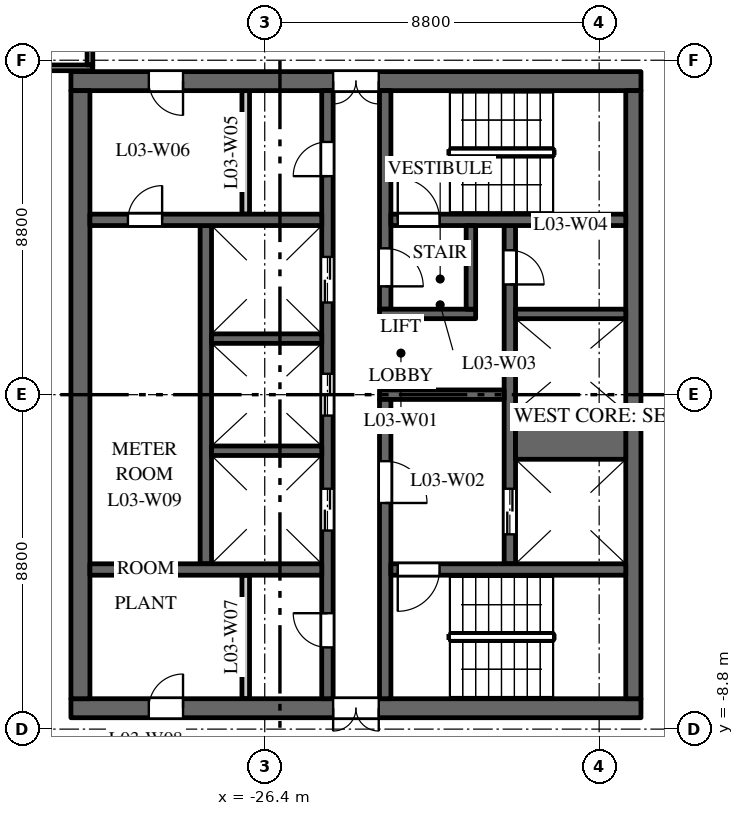
"""IFC4 building model, lengths in metres.
Left out: names, types, materials, properties, quantities, classifications, styles, units other than length and angle.
Written with IfcOpenShell. Run it as: python <this file> out.ifc"""

import sys

from ifc_helpers import new_model, si_unit, direction, frame, frame_2d, origin, place, context, subcontext, project, spatial, rectangle, extrude, element, fill, save


model = new_model("IFC4")
c1 = context("Model", 3, precision=1e-05, world=origin(), true_north=direction((0.0, 1.0)))
c2 = subcontext(c1, "Body", "Model", "MODEL_VIEW")
j1 = project(units=[si_unit("LENGTHUNIT", "METRE"), si_unit("PLANEANGLEUNIT", "RADIAN")], contexts=[c1])
p1 = place(None, origin())
s1 = spatial("IfcSite", under=j1, at=p1, CompositionType="ELEMENT")
p2 = place(p1, origin())
s2 = spatial("IfcBuilding", under=s1, at=p2, CompositionType="ELEMENT")
p3 = place(p2, frame((0.0, 0.0, 19.5)))
s3 = spatial("IfcBuildingStorey", under=s2, at=p3, CompositionType="ELEMENT", Elevation=19.5)
p4 = place(p3, frame((-16.5, 8.25, 0.0), z_axis=(0.0, 0.0, 1.0), x_axis=(-1.0, 0.0, 0.0)))
e1 = element("IfcWall", 1, at=p4, inside=s3, PredefinedType="SHEAR", context=c2, shape_type="SweptSolid", body=[
    extrude(rectangle(XDim=15.0, YDim=0.5, at=frame_2d((7.5, 0.0))), origin(), (0.0, 0.0, 1.0), 5.25),
])
p5 = place(p4, frame((6.9, 0.0, 0.0)))
e2 = element("IfcOpeningElement", 2, at=p5, cuts=e1, PredefinedType="OPENING", context=c2, shape_type="SweptSolid", body=[
    extrude(rectangle(XDim=1.2, YDim=2.1, at=frame_2d((0.6, 1.05))), frame((0.0, 0.26, 0.0), z_axis=(0.0, -1.0, 0.0), x_axis=(1.0, 0.0, 0.0)), (0.0, 0.0, 1.0), 0.52),
])
p6 = place(p4, frame((12.05, 0.0, 0.0)))
e3 = element("IfcOpeningElement", 3, at=p6, cuts=e1, PredefinedType="OPENING", context=c2, shape_type="SweptSolid", body=[
    extrude(rectangle(XDim=0.9, YDim=2.1, at=frame_2d((0.45, 1.05))), frame((0.0, 0.26, 0.0), z_axis=(0.0, -1.0, 0.0), x_axis=(1.0, 0.0, 0.0)), (0.0, 0.0, 1.0), 0.52),
])
p7 = place(p3, frame((-16.5, -8.25, 0.0), z_axis=(0.0, 0.0, 1.0), x_axis=(-1.0, 0.0, 0.0)))
e4 = element("IfcWall", 4, at=p7, inside=s3, PredefinedType="SHEAR", context=c2, shape_type="SweptSolid", body=[
    extrude(rectangle(XDim=15.0, YDim=0.5, at=frame_2d((7.5, 0.0))), origin(), (0.0, 0.0, 1.0), 5.25),
])
p8 = place(p7, frame((6.9, 0.0, 0.0)))
e5 = element("IfcOpeningElement", 5, at=p8, cuts=e4, PredefinedType="OPENING", context=c2, shape_type="SweptSolid", body=[
    extrude(rectangle(XDim=1.2, YDim=2.1, at=frame_2d((0.6, 1.05))), frame((0.0, 0.26, 0.0), z_axis=(0.0, -1.0, 0.0), x_axis=(1.0, 0.0, 0.0)), (0.0, 0.0, 1.0), 0.52),
])
p9 = place(p7, frame((12.05, 0.0, 0.0)))
e6 = element("IfcOpeningElement", 6, at=p9, cuts=e4, PredefinedType="OPENING", context=c2, shape_type="SweptSolid", body=[
    extrude(rectangle(XDim=0.9, YDim=2.1, at=frame_2d((0.45, 1.05))), frame((0.0, 0.26, 0.0), z_axis=(0.0, -1.0, 0.0), x_axis=(1.0, 0.0, 0.0)), (0.0, 0.0, 1.0), 0.52),
])
p10 = place(p3, frame((-27.95, -4.45, 0.0), z_axis=(0.0, 0.0, 1.0), x_axis=(0.0, 1.0, 0.0)))
e7 = element("IfcWall", 7, at=p10, inside=s3, PredefinedType="SHEAR", context=c2, shape_type="SweptSolid", body=[
    extrude(rectangle(XDim=8.9, YDim=0.3, at=frame_2d((4.45, 0.0))), origin(), (0.0, 0.0, 1.0), 5.25),
])
p11 = place(p3, frame((-19.95, -4.45, 0.0), z_axis=(0.0, 0.0, 1.0), x_axis=(0.0, 1.0, 0.0)))
e8 = element("IfcWall", 8, at=p11, inside=s3, PredefinedType="SHEAR", context=c2, shape_type="SweptSolid", body=[
    extrude(rectangle(XDim=8.9, YDim=0.3, at=frame_2d((4.45, 0.0))), origin(), (0.0, 0.0, 1.0), 5.25),
])
p12 = place(p11, frame((0.775, 0.0, 0.0)))
e9 = element("IfcOpeningElement", 9, at=p12, cuts=e8, PredefinedType="OPENING", context=c2, shape_type="SweptSolid", body=[
    extrude(rectangle(XDim=1.2, YDim=2.1, at=frame_2d((0.6, 1.05))), frame((0.0, 0.16, 0.0), z_axis=(0.0, -1.0, 0.0), x_axis=(1.0, 0.0, 0.0)), (0.0, 0.0, 1.0), 0.32),
])
p13 = place(p11, frame((7.35, 0.0, 0.0)))
e10 = element("IfcOpeningElement", 10, at=p13, cuts=e8, PredefinedType="OPENING", context=c2, shape_type="SweptSolid", body=[
    extrude(rectangle(XDim=0.9, YDim=2.1, at=frame_2d((0.45, 1.05))), frame((0.0, 0.16, 0.0), z_axis=(0.0, -1.0, 0.0), x_axis=(1.0, 0.0, 0.0)), (0.0, 0.0, 1.0), 0.32),
])
p14 = place(p3, frame((-24.75, -8.0, 0.0), z_axis=(0.0, 0.0, 1.0), x_axis=(0.0, 1.0, 0.0)))
e11 = element("IfcWall", 11, at=p14, inside=s3, PredefinedType="SHEAR", context=c2, shape_type="SweptSolid", body=[
    extrude(rectangle(XDim=16.0, YDim=0.3, at=frame_2d((8.0, 0.0))), origin(), (0.0, 0.0, 1.0), 5.25),
])
p15 = place(p14, frame((4.425, 0.0, 0.0)))
e12 = element("IfcOpeningElement", 12, at=p15, cuts=e11, PredefinedType="OPENING", context=c2, shape_type="SweptSolid", body=[
    extrude(rectangle(XDim=1.1, YDim=2.1, at=frame_2d((0.55, 1.05))), frame((0.0, 0.16, 0.0), z_axis=(0.0, -1.0, 0.0), x_axis=(1.0, 0.0, 0.0)), (0.0, 0.0, 1.0), 0.32),
])
p16 = place(p14, frame((7.45, 0.0, 0.0)))
e13 = element("IfcOpeningElement", 13, at=p16, cuts=e11, PredefinedType="OPENING", context=c2, shape_type="SweptSolid", body=[
    extrude(rectangle(XDim=1.1, YDim=2.1, at=frame_2d((0.55, 1.05))), frame((0.0, 0.16, 0.0), z_axis=(0.0, -1.0, 0.0), x_axis=(1.0, 0.0, 0.0)), (0.0, 0.0, 1.0), 0.32),
])
p17 = place(p14, frame((10.425, 0.0, 0.0)))
e14 = element("IfcOpeningElement", 14, at=p17, cuts=e11, PredefinedType="OPENING", context=c2, shape_type="SweptSolid", body=[
    extrude(rectangle(XDim=1.2, YDim=2.1, at=frame_2d((0.6, 1.05))), frame((0.0, 0.16, 0.0), z_axis=(0.0, -1.0, 0.0), x_axis=(1.0, 0.0, 0.0)), (0.0, 0.0, 1.0), 0.32),
])
p18 = place(p14, frame((13.75, 0.0, 0.0)))
e15 = element("IfcOpeningElement", 15, at=p18, cuts=e11, PredefinedType="OPENING", context=c2, shape_type="SweptSolid", body=[
    extrude(rectangle(XDim=0.9, YDim=2.1, at=frame_2d((0.45, 1.05))), frame((0.0, 0.16, 0.0), z_axis=(0.0, -1.0, 0.0), x_axis=(1.0, 0.0, 0.0)), (0.0, 0.0, 1.0), 0.32),
])
p19 = place(p14, frame((1.35, 0.0, 0.0)))
e16 = element("IfcOpeningElement", 16, at=p19, cuts=e11, PredefinedType="OPENING", context=c2, shape_type="SweptSolid", body=[
    extrude(rectangle(XDim=0.9, YDim=2.1, at=frame_2d((0.45, 1.05))), frame((0.0, 0.16, 0.0), z_axis=(0.0, -1.0, 0.0), x_axis=(1.0, 0.0, 0.0)), (0.0, 0.0, 1.0), 0.32),
])
p20 = place(p3, frame((-20.1, 0.0, 0.0), z_axis=(0.0, 0.0, 1.0), x_axis=(-1.0, 0.0, 0.0)))
e17 = element("IfcWall", 17, at=p20, inside=s3, PredefinedType="SHEAR", context=c2, shape_type="SweptSolid", body=[
    extrude(rectangle(XDim=3.28, YDim=0.25, at=frame_2d((1.64, 0.0))), origin(), (0.0, 0.0, 1.0), 5.25),
])
p21 = place(p3, frame((-16.7, -8.0, 0.0), z_axis=(0.0, 0.0, 1.0), x_axis=(0.0, 1.0, 0.0)))
e18 = element("IfcWall", 18, at=p21, inside=s3, PredefinedType="SHEAR", context=c2, shape_type="SweptSolid", body=[
    extrude(rectangle(XDim=16.0, YDim=0.4, at=frame_2d((8.0, 0.0))), origin(), (0.0, 0.0, 1.0), 5.25),
])
p22 = place(p3, frame((-31.25, -8.0, 0.0), z_axis=(0.0, 0.0, 1.0), x_axis=(0.0, 1.0, 0.0)))
e19 = element("IfcWall", 19, at=p22, inside=s3, PredefinedType="SHEAR", context=c2, shape_type="SweptSolid", body=[
    extrude(rectangle(XDim=16.0, YDim=0.5, at=frame_2d((8.0, 0.0))), origin(), (0.0, 0.0, 1.0), 5.25),
])
p23 = place(p3, frame((-24.9, 4.6, 0.0), z_axis=(0.0, 0.0, 1.0), x_axis=(-1.0, 0.0, 0.0)))
e20 = element("IfcWall", 20, at=p23, inside=s3, PredefinedType="SHEAR", context=c2, shape_type="SweptSolid", body=[
    extrude(rectangle(XDim=6.1, YDim=0.3, at=frame_2d((3.05, 0.0))), origin(), (0.0, 0.0, 1.0), 5.25),
])
p24 = place(p23, frame((4.2, 0.0, 0.0)))
e21 = element("IfcOpeningElement", 21, at=p24, cuts=e20, PredefinedType="OPENING", context=c2, shape_type="SweptSolid", body=[
    extrude(rectangle(XDim=0.9, YDim=2.1, at=frame_2d((0.45, 1.05))), frame((0.0, 0.16, 0.0), z_axis=(0.0, -1.0, 0.0), x_axis=(1.0, 0.0, 0.0)), (0.0, 0.0, 1.0), 0.32),
])
for number, where, z_axis, x_axis in (
    (22, (-26.9, 4.75, 0.0), (0.0, 0.0, 1.0), (0.0, 1.0, 0.0)),
    (23, (-26.9, -8.0, 0.0), (0.0, 0.0, 1.0), (0.0, 1.0, 0.0)),
):
    element("IfcWall", number, at=place(p3, frame(where, z_axis=z_axis, x_axis=x_axis)), inside=s3, PredefinedType="PARTITIONING", context=c2, shape_type="SweptSolid", body=[
        extrude(rectangle(XDim=3.25, YDim=0.2, at=frame_2d((1.625, 0.0))), origin(), (0.0, 0.0, 1.0), 5.25),
    ])
p25 = place(p3, frame((-24.9, -4.6, 0.0), z_axis=(0.0, 0.0, 1.0), x_axis=(-1.0, 0.0, 0.0)))
e24 = element("IfcWall", 24, at=p25, inside=s3, PredefinedType="SHEAR", context=c2, shape_type="SweptSolid", body=[
    extrude(rectangle(XDim=6.1, YDim=0.3, at=frame_2d((3.05, 0.0))), origin(), (0.0, 0.0, 1.0), 5.25),
])
p26 = place(p3, frame((-16.9, -1.075, 0.0), z_axis=(0.0, 0.0, 1.0), x_axis=(-1.0, 0.0, 0.0)))
e25 = element("IfcWall", 25, at=p26, inside=s3, PredefinedType="SHEAR", context=c2, shape_type="SweptSolid", body=[
    extrude(rectangle(XDim=2.9, YDim=1.25, at=frame_2d((1.45, 0.0))), origin(), (0.0, 0.0, 1.0), 5.25),
])
for number, where, z_axis, x_axis in (
    (26, (-16.9, 2.125, 0.0), (0.0, 0.0, 1.0), (-1.0, 0.0, 0.0)),
    (27, (-24.9, -1.475, 0.0), (0.0, 0.0, 1.0), (-1.0, 0.0, 0.0)),
    (28, (-24.9, 1.475, 0.0), (0.0, 0.0, 1.0), (-1.0, 0.0, 0.0)),
):
    element("IfcWall", number, at=place(p3, frame(where, z_axis=z_axis, x_axis=x_axis)), inside=s3, PredefinedType="SHEAR", context=c2, shape_type="SweptSolid", body=[
        extrude(rectangle(XDim=2.9, YDim=0.25, at=frame_2d((1.45, 0.0))), origin(), (0.0, 0.0, 1.0), 5.25),
    ])
p27 = place(p3, frame((-23.23, 2.25, 0.0), z_axis=(0.0, 0.0, 1.0), x_axis=(0.0, 1.0, 0.0)))
e29 = element("IfcWall", 29, at=p27, inside=s3, PredefinedType="SHEAR", context=c2, shape_type="SweptSolid", body=[
    extrude(rectangle(XDim=5.75, YDim=0.3, at=frame_2d((2.875, 0.0))), origin(), (0.0, 0.0, 1.0), 5.25),
])
p28 = place(p27, frame((0.6, 0.0, 0.0)))
e30 = element("IfcOpeningElement", 30, at=p28, cuts=e29, PredefinedType="OPENING", context=c2, shape_type="SweptSolid", body=[
    extrude(rectangle(XDim=1.0, YDim=2.1, at=frame_2d((0.5, 1.05))), frame((0.0, 0.16, 0.0), z_axis=(0.0, -1.0, 0.0), x_axis=(1.0, 0.0, 0.0)), (0.0, 0.0, 1.0), 0.32),
])
p29 = place(p3, frame((-23.23, -8.0, 0.0), z_axis=(0.0, 0.0, 1.0), x_axis=(0.0, 1.0, 0.0)))
e31 = element("IfcWall", 31, at=p29, inside=s3, PredefinedType="SHEAR", context=c2, shape_type="SweptSolid", body=[
    extrude(rectangle(XDim=7.875, YDim=0.3, at=frame_2d((3.938, 0.0))), origin(), (0.0, 0.0, 1.0), 5.25),
])
p30 = place(p29, frame((5.15, 0.0, 0.0)))
e32 = element("IfcOpeningElement", 32, at=p30, cuts=e31, PredefinedType="OPENING", context=c2, shape_type="SweptSolid", body=[
    extrude(rectangle(XDim=1.1, YDim=2.1, at=frame_2d((0.55, 1.05))), frame((0.0, 0.16, 0.0), z_axis=(0.0, -1.0, 0.0), x_axis=(1.0, 0.0, 0.0)), (0.0, 0.0, 1.0), 0.32),
])
p31 = place(p3, frame((-16.9, 4.6, 0.0), z_axis=(0.0, 0.0, 1.0), x_axis=(-1.0, 0.0, 0.0)))
e33 = element("IfcWall", 33, at=p31, inside=s3, PredefinedType="SHEAR", context=c2, shape_type="SweptSolid", body=[
    extrude(rectangle(XDim=6.18, YDim=0.3, at=frame_2d((3.09, 0.0))), origin(), (0.0, 0.0, 1.0), 5.25),
])
p32 = place(p31, frame((4.9, 0.0, 0.0)))
e34 = element("IfcOpeningElement", 34, at=p32, cuts=e33, PredefinedType="OPENING", context=c2, shape_type="SweptSolid", body=[
    extrude(rectangle(XDim=1.1, YDim=2.1, at=frame_2d((0.55, 1.05))), frame((0.0, 0.16, 0.0), z_axis=(0.0, -1.0, 0.0), x_axis=(1.0, 0.0, 0.0)), (0.0, 0.0, 1.0), 0.32),
])
p33 = place(p3, frame((-16.9, -4.6, 0.0), z_axis=(0.0, 0.0, 1.0), x_axis=(-1.0, 0.0, 0.0)))
e35 = element("IfcWall", 35, at=p33, inside=s3, PredefinedType="SHEAR", context=c2, shape_type="SweptSolid", body=[
    extrude(rectangle(XDim=6.18, YDim=0.3, at=frame_2d((3.09, 0.0))), origin(), (0.0, 0.0, 1.0), 5.25),
])
p34 = place(p33, frame((4.9, 0.0, 0.0)))
e36 = element("IfcOpeningElement", 36, at=p34, cuts=e35, PredefinedType="OPENING", context=c2, shape_type="SweptSolid", body=[
    extrude(rectangle(XDim=1.1, YDim=2.1, at=frame_2d((0.55, 1.05))), frame((0.0, 0.16, 0.0), z_axis=(0.0, -1.0, 0.0), x_axis=(1.0, 0.0, 0.0)), (0.0, 0.0, 1.0), 0.32),
])
p35 = place(p3, frame((-20.85, 2.125, 0.0), z_axis=(0.0, 0.0, 1.0), x_axis=(-1.0, 0.0, 0.0)))
e37 = element("IfcWall", 37, at=p35, inside=s3, PredefinedType="SHEAR", context=c2, shape_type="SweptSolid", body=[
    extrude(rectangle(XDim=2.53, YDim=0.25, at=frame_2d((1.265, 0.0))), origin(), (0.0, 0.0, 1.0), 5.25),
])
p36 = place(p3, frame((-20.975, 2.25, 0.0), z_axis=(0.0, 0.0, 1.0), x_axis=(0.0, 1.0, 0.0)))
e38 = element("IfcWall", 38, at=p36, inside=s3, PredefinedType="SHEAR", context=c2, shape_type="SweptSolid", body=[
    extrude(rectangle(XDim=2.2, YDim=0.25, at=frame_2d((1.1, 0.0))), origin(), (0.0, 0.0, 1.0), 5.25),
])
p37 = place(p3, frame((-30.925, 8.6, 0.0), z_axis=(0.0, 0.0, 1.0), x_axis=(-1.0, 0.0, 0.0)))
e39 = element("IfcWall", 39, at=p37, inside=s3, PredefinedType="PARTITIONING", context=c2, shape_type="SweptSolid", body=[
    extrude(rectangle(XDim=8.025, YDim=0.15, at=frame_2d((4.012, 0.0))), origin(), (0.0, 0.0, 1.0), 4.35),
])
p38 = place(p37, frame((4.012, 0.0, 0.0)))
e40 = element("IfcOpeningElement", 40, at=p38, cuts=e39, PredefinedType="OPENING", context=c2, shape_type="SweptSolid", body=[
    extrude(rectangle(XDim=1.0, YDim=2.1, at=frame_2d((0.5, 1.05))), frame((0.0, 0.085, 0.0), z_axis=(0.0, -1.0, 0.0), x_axis=(1.0, 0.0, 0.0)), (0.0, 0.0, 1.0), 0.17),
])
p39 = place(p3, frame((-31.0, 11.925, 0.0), z_axis=(0.0, 0.0, 1.0), x_axis=(0.0, -1.0, 0.0)))
e41 = element("IfcWall", 41, at=p39, inside=s3, PredefinedType="PARTITIONING", context=c2, shape_type="SweptSolid", body=[
    extrude(rectangle(XDim=3.25, YDim=0.15, at=frame_2d((1.625, 0.0))), origin(), (0.0, 0.0, 1.0), 5.25),
])
p40 = place(p12, origin())
e42 = element("IfcDoor", 42, at=p40, inside=s3, OperationType="DOUBLE_DOOR_SLIDING", PredefinedType="DOOR", context=c2, shape_type="SweptSolid", body=[
    extrude(rectangle(XDim=1.2, YDim=2.1, at=frame_2d((0.6, 1.05))), frame((0.0, 0.025, 0.0), z_axis=(0.0, -1.0, 0.0), x_axis=(1.0, 0.0, 0.0)), (0.0, 0.0, 1.0), 0.05),
])
fill(e9, e42)
p41 = place(p15, origin())
e43 = element("IfcDoor", 43, at=p41, inside=s3, OperationType="DOUBLE_DOOR_SLIDING", PredefinedType="DOOR", context=c2, shape_type="SweptSolid", body=[
    extrude(rectangle(XDim=1.1, YDim=2.1, at=frame_2d((0.55, 1.05))), frame((0.0, 0.025, 0.0), z_axis=(0.0, -1.0, 0.0), x_axis=(1.0, 0.0, 0.0)), (0.0, 0.0, 1.0), 0.05),
])
fill(e12, e43)
p42 = place(p16, origin())
e44 = element("IfcDoor", 44, at=p42, inside=s3, OperationType="DOUBLE_DOOR_SLIDING", PredefinedType="DOOR", context=c2, shape_type="SweptSolid", body=[
    extrude(rectangle(XDim=1.1, YDim=2.1, at=frame_2d((0.55, 1.05))), frame((0.0, 0.025, 0.0), z_axis=(0.0, -1.0, 0.0), x_axis=(1.0, 0.0, 0.0)), (0.0, 0.0, 1.0), 0.05),
])
fill(e13, e44)
p43 = place(p17, origin())
e45 = element("IfcDoor", 45, at=p43, inside=s3, OperationType="DOUBLE_DOOR_SLIDING", PredefinedType="DOOR", context=c2, shape_type="SweptSolid", body=[
    extrude(rectangle(XDim=1.2, YDim=2.1, at=frame_2d((0.6, 1.05))), frame((0.0, 0.025, 0.0), z_axis=(0.0, -1.0, 0.0), x_axis=(1.0, 0.0, 0.0)), (0.0, 0.0, 1.0), 0.05),
])
fill(e14, e45)
p44 = place(p32, origin())
e46 = element("IfcDoor", 46, at=p44, inside=s3, OperationType="SINGLE_SWING_RIGHT", PredefinedType="DOOR", context=c2, shape_type="SweptSolid", body=[
    extrude(rectangle(XDim=1.1, YDim=2.1, at=frame_2d((0.55, 1.05))), frame((0.0, 0.025, 0.0), z_axis=(0.0, -1.0, 0.0), x_axis=(1.0, 0.0, 0.0)), (0.0, 0.0, 1.0), 0.05),
])
fill(e34, e46)
p45 = place(p34, origin())
e47 = element("IfcDoor", 47, at=p45, inside=s3, OperationType="SINGLE_SWING_LEFT", PredefinedType="DOOR", context=c2, shape_type="SweptSolid", body=[
    extrude(rectangle(XDim=1.1, YDim=2.1, at=frame_2d((0.55, 1.05))), frame((0.0, 0.025, 0.0), z_axis=(0.0, -1.0, 0.0), x_axis=(1.0, 0.0, 0.0)), (0.0, 0.0, 1.0), 0.05),
])
fill(e36, e47)
p46 = place(p30, origin())
e48 = element("IfcDoor", 48, at=p46, inside=s3, OperationType="SINGLE_SWING_LEFT", PredefinedType="DOOR", context=c2, shape_type="SweptSolid", body=[
    extrude(rectangle(XDim=1.1, YDim=2.1, at=frame_2d((0.55, 1.05))), frame((0.0, 0.025, 0.0), z_axis=(0.0, -1.0, 0.0), x_axis=(1.0, 0.0, 0.0)), (0.0, 0.0, 1.0), 0.05),
])
fill(e32, e48)
p47 = place(p28, origin())
e49 = element("IfcDoor", 49, at=p47, inside=s3, OperationType="SINGLE_SWING_LEFT", PredefinedType="DOOR", context=c2, shape_type="SweptSolid", body=[
    extrude(rectangle(XDim=1.0, YDim=2.1, at=frame_2d((0.5, 1.05))), frame((0.0, 0.025, 0.0), z_axis=(0.0, -1.0, 0.0), x_axis=(1.0, 0.0, 0.0)), (0.0, 0.0, 1.0), 0.05),
])
fill(e30, e49)
p48 = place(p5, origin())
e50 = element("IfcDoor", 50, at=p48, inside=s3, OperationType="DOUBLE_DOOR_DOUBLE_SWING", PredefinedType="DOOR", context=c2, shape_type="SweptSolid", body=[
    extrude(rectangle(XDim=1.2, YDim=2.1, at=frame_2d((0.6, 1.05))), frame((0.0, 0.025, 0.0), z_axis=(0.0, -1.0, 0.0), x_axis=(1.0, 0.0, 0.0)), (0.0, 0.0, 1.0), 0.05),
])
fill(e2, e50)
p49 = place(p8, origin())
e51 = element("IfcDoor", 51, at=p49, inside=s3, OperationType="DOUBLE_DOOR_DOUBLE_SWING", PredefinedType="DOOR", context=c2, shape_type="SweptSolid", body=[
    extrude(rectangle(XDim=1.2, YDim=2.1, at=frame_2d((0.6, 1.05))), frame((0.0, 0.025, 0.0), z_axis=(0.0, -1.0, 0.0), x_axis=(1.0, 0.0, 0.0)), (0.0, 0.0, 1.0), 0.05),
])
fill(e5, e51)
p50 = place(p13, origin())
e52 = element("IfcDoor", 52, at=p50, inside=s3, OperationType="SINGLE_SWING_LEFT", PredefinedType="DOOR", context=c2, shape_type="SweptSolid", body=[
    extrude(rectangle(XDim=0.9, YDim=2.1, at=frame_2d((0.45, 1.05))), frame((0.0, 0.025, 0.0), z_axis=(0.0, -1.0, 0.0), x_axis=(1.0, 0.0, 0.0)), (0.0, 0.0, 1.0), 0.05),
])
fill(e10, e52)
p51 = place(p18, origin())
e53 = element("IfcDoor", 53, at=p51, inside=s3, OperationType="SINGLE_SWING_RIGHT", PredefinedType="DOOR", context=c2, shape_type="SweptSolid", body=[
    extrude(rectangle(XDim=0.9, YDim=2.1, at=frame_2d((0.45, 1.05))), frame((0.0, 0.025, 0.0), z_axis=(0.0, -1.0, 0.0), x_axis=(1.0, 0.0, 0.0)), (0.0, 0.0, 1.0), 0.05),
])
fill(e15, e53)
p52 = place(p6, origin())
e54 = element("IfcDoor", 54, at=p52, inside=s3, OperationType="SINGLE_SWING_RIGHT", PredefinedType="DOOR", context=c2, shape_type="SweptSolid", body=[
    extrude(rectangle(XDim=0.9, YDim=2.1, at=frame_2d((0.45, 1.05))), frame((0.0, 0.025, 0.0), z_axis=(0.0, -1.0, 0.0), x_axis=(1.0, 0.0, 0.0)), (0.0, 0.0, 1.0), 0.05),
])
fill(e3, e54)
p53 = place(p19, origin())
e55 = element("IfcDoor", 55, at=p53, inside=s3, OperationType="SINGLE_SWING_LEFT", PredefinedType="DOOR", context=c2, shape_type="SweptSolid", body=[
    extrude(rectangle(XDim=0.9, YDim=2.1, at=frame_2d((0.45, 1.05))), frame((0.0, 0.025, 0.0), z_axis=(0.0, -1.0, 0.0), x_axis=(1.0, 0.0, 0.0)), (0.0, 0.0, 1.0), 0.05),
])
fill(e16, e55)
p54 = place(p9, origin())
e56 = element("IfcDoor", 56, at=p54, inside=s3, OperationType="SINGLE_SWING_LEFT", PredefinedType="DOOR", context=c2, shape_type="SweptSolid", body=[
    extrude(rectangle(XDim=0.9, YDim=2.1, at=frame_2d((0.45, 1.05))), frame((0.0, 0.025, 0.0), z_axis=(0.0, -1.0, 0.0), x_axis=(1.0, 0.0, 0.0)), (0.0, 0.0, 1.0), 0.05),
])
fill(e6, e56)
p55 = place(p24, origin())
e57 = element("IfcDoor", 57, at=p55, inside=s3, OperationType="SINGLE_SWING_LEFT", PredefinedType="DOOR", context=c2, shape_type="SweptSolid", body=[
    extrude(rectangle(XDim=0.9, YDim=2.1, at=frame_2d((0.45, 1.05))), frame((0.0, 0.025, 0.0), z_axis=(0.0, -1.0, 0.0), x_axis=(1.0, 0.0, 0.0)), (0.0, 0.0, 1.0), 0.05),
])
fill(e21, e57)
save(model, sys.argv[1])
